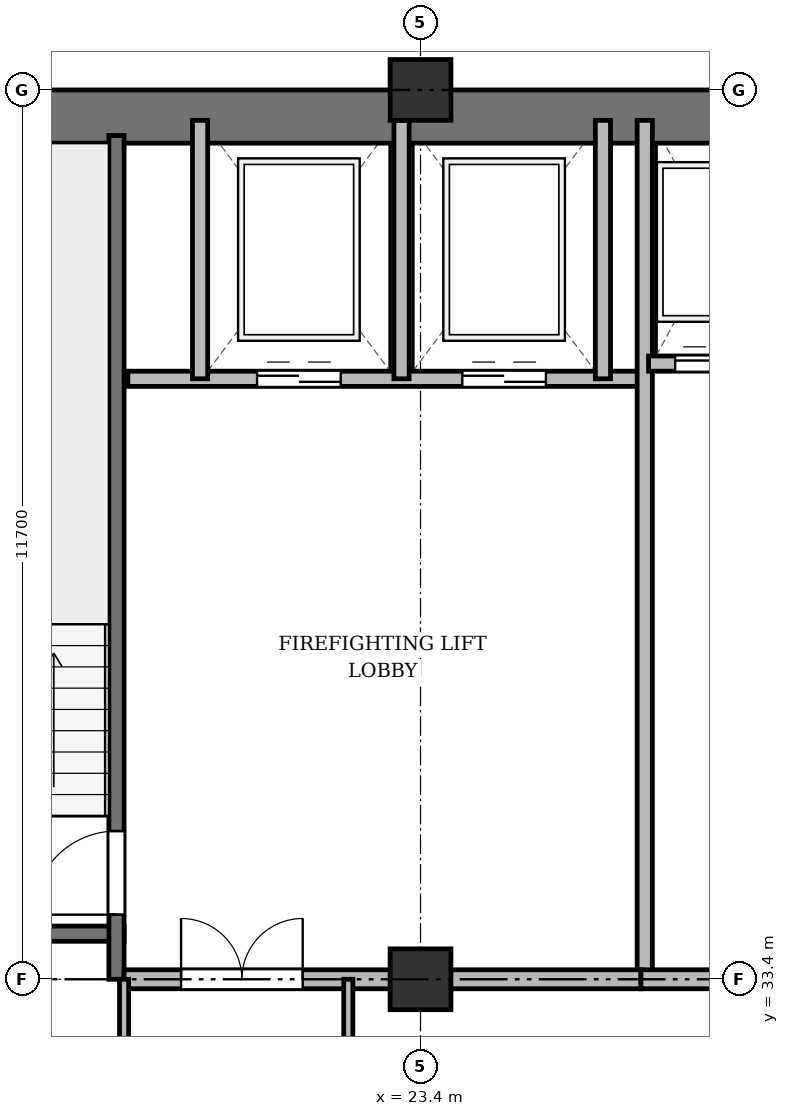
"""IFC4 building model, lengths in metres.
Left out: names, types, materials, properties, quantities, classifications, styles, units other than length and angle.
Written with IfcOpenShell. Run it as: python <this file> out.ifc"""

import sys

from ifc_helpers import new_model, si_unit, direction, frame, frame_2d, origin, origin_2d, place, context, subcontext, project, spatial, rectangle, extrude, source, transform, mapped, element, fill, save


model = new_model("IFC4")
c1 = context("Model", 3, precision=1e-05, world=origin(), true_north=direction((0.0, 1.0)))
c2 = subcontext(c1, "Body", "Model", "MODEL_VIEW")
j1 = project(units=[si_unit("LENGTHUNIT", "METRE"), si_unit("PLANEANGLEUNIT", "RADIAN")], contexts=[c1])
p1 = place(None, origin())
s1 = spatial("IfcSite", under=j1, at=p1, CompositionType="ELEMENT")
p2 = place(p1, origin())
s2 = spatial("IfcBuilding", under=s1, at=p2, CompositionType="ELEMENT")
p3 = place(p2, frame((0.0, 0.0, 85.3)))
s3 = spatial("IfcBuildingStorey", under=s2, at=p3, CompositionType="ELEMENT", Elevation=85.3)
m1 = source(origin(), c2, "Body", "SweptSolid", [
    extrude(rectangle(XDim=0.8, YDim=0.8, at=origin_2d()), origin(), (0.0, 0.0, 1.0), 3.6),
])
for number, where, z_axis, x_axis in (
    (1, (23.4, 33.4, 0.0), (0.0, 0.0, 1.0), (1.0, 0.0, 0.0)),
    (2, (23.4, 45.1, 0.0), (0.0, 0.0, 1.0), (1.0, 0.0, 0.0)),
):
    element("IfcColumn", number, at=place(p3, frame(where, z_axis=z_axis, x_axis=x_axis)), inside=s3, PredefinedType="COLUMN", context=c2, shape_type="MappedRepresentation", body=[
        mapped(m1, transform((0.0, 0.0, 0.0), x_axis=(1.0, 0.0, 0.0), y_axis=(0.0, 1.0, 0.0), z_axis=(0.0, 0.0, 1.0), scale=1.0)),
    ])
p4 = place(p3, frame((15.5, 44.75, 0.0), z_axis=(0.0, 0.0, 1.0), x_axis=(1.0, 0.0, 0.0)))
e3 = element("IfcWall", 3, at=p4, inside=s3, PredefinedType="SHEAR", context=c2, shape_type="SweptSolid", body=[
    extrude(rectangle(XDim=43.4, YDim=0.7, at=frame_2d((21.7, 0.0))), origin(), (0.0, 0.0, 1.0), 3.34),
])
p5 = place(p3, frame((16.1, 34.0, 0.0), z_axis=(0.0, 0.0, 1.0), x_axis=(1.0, 0.0, 0.0)))
e4 = element("IfcWall", 4, at=p5, inside=s3, PredefinedType="SHEAR", context=c2, shape_type="SweptSolid", body=[
    extrude(rectangle(XDim=3.4, YDim=0.2, at=frame_2d((1.7, 0.0))), origin(), (0.0, 0.0, 1.0), 3.34),
])
p6 = place(p3, frame((19.4, 33.4, 0.0), z_axis=(0.0, 0.0, 1.0), x_axis=(0.0, 1.0, 0.0)))
e5 = element("IfcWall", 5, at=p6, inside=s3, PredefinedType="SHEAR", context=c2, shape_type="SweptSolid", body=[
    extrude(rectangle(XDim=11.1, YDim=0.2, at=frame_2d((5.55, 0.0))), origin(), (0.0, 0.0, 1.0), 3.34),
])
p7 = place(p6, frame((0.85, 0.0, 0.0)))
e6 = element("IfcOpeningElement", 6, at=p7, cuts=e5, PredefinedType="OPENING", context=c2, shape_type="SweptSolid", body=[
    extrude(rectangle(XDim=1.1, YDim=2.15, at=frame_2d((0.55, 1.075))), frame((0.0, 0.11, 0.0), z_axis=(0.0, -1.0, 0.0), x_axis=(1.0, 0.0, 0.0)), (0.0, 0.0, 1.0), 0.22),
])
p8 = place(p3, frame((19.55, 41.3, 0.0), z_axis=(0.0, 0.0, 1.0), x_axis=(1.0, 0.0, 0.0)))
e7 = element("IfcWall", 7, at=p8, inside=s3, PredefinedType="SOLIDWALL", context=c2, shape_type="SweptSolid", body=[
    extrude(rectangle(XDim=6.75, YDim=0.2, at=frame_2d((3.375, 0.0))), origin(), (0.0, 0.0, 1.0), 3.34),
])
p9 = place(p8, frame((1.7, 0.0, 0.0)))
e8 = element("IfcOpeningElement", 8, at=p9, cuts=e7, PredefinedType="OPENING", context=c2, shape_type="SweptSolid", body=[
    extrude(rectangle(XDim=1.1, YDim=2.15, at=frame_2d((0.55, 1.075))), frame((0.0, 0.11, 0.0), z_axis=(0.0, -1.0, 0.0), x_axis=(1.0, 0.0, 0.0)), (0.0, 0.0, 1.0), 0.22),
])
p10 = place(p8, frame((4.4, 0.0, 0.0)))
e9 = element("IfcOpeningElement", 9, at=p10, cuts=e7, PredefinedType="OPENING", context=c2, shape_type="SweptSolid", body=[
    extrude(rectangle(XDim=1.1, YDim=2.15, at=frame_2d((0.55, 1.075))), frame((0.0, 0.11, 0.0), z_axis=(0.0, -1.0, 0.0), x_axis=(1.0, 0.0, 0.0)), (0.0, 0.0, 1.0), 0.22),
])
for number, where, z_axis, x_axis in (
    (10, (20.5, 41.3, 0.0), (0.0, 0.0, 1.0), (0.0, 1.0, 0.0)),
    (11, (23.15, 41.3, 0.0), (0.0, 0.0, 1.0), (0.0, 1.0, 0.0)),
    (12, (25.8, 41.3, 0.0), (0.0, 0.0, 1.0), (0.0, 1.0, 0.0)),
):
    element("IfcWall", number, at=place(p3, frame(where, z_axis=z_axis, x_axis=x_axis)), inside=s3, PredefinedType="SOLIDWALL", context=c2, shape_type="SweptSolid", body=[
        extrude(rectangle(XDim=3.4, YDim=0.2, at=frame_2d((1.7, 0.0))), origin(), (0.0, 0.0, 1.0), 3.34),
    ])
p11 = place(p3, frame((26.35, 33.4, 0.0), z_axis=(0.0, 0.0, 1.0), x_axis=(0.0, 1.0, 0.0)))
e13 = element("IfcWall", 13, at=p11, inside=s3, PredefinedType="SOLIDWALL", context=c2, shape_type="SweptSolid", body=[
    extrude(rectangle(XDim=11.3, YDim=0.2, at=frame_2d((5.65, 0.0))), origin(), (0.0, 0.0, 1.0), 2.752),
])
p12 = place(p3, frame((19.5, 33.4, 0.0), z_axis=(0.0, 0.0, 1.0), x_axis=(1.0, 0.0, 0.0)))
e14 = element("IfcWall", 14, at=p12, inside=s3, PredefinedType="PARTITIONING", context=c2, shape_type="SweptSolid", body=[
    extrude(rectangle(XDim=6.8, YDim=0.25, at=frame_2d((3.4, 0.0))), origin(), (0.0, 0.0, 1.0), 2.752),
])
p13 = place(p12, frame((0.75, 0.0, 0.0)))
e15 = element("IfcOpeningElement", 15, at=p13, cuts=e14, PredefinedType="OPENING", context=c2, shape_type="SweptSolid", body=[
    extrude(rectangle(XDim=1.6, YDim=2.2, at=frame_2d((0.8, 1.1))), frame((0.0, 0.135, 0.0), z_axis=(0.0, -1.0, 0.0), x_axis=(1.0, 0.0, 0.0)), (0.0, 0.0, 1.0), 0.27),
])
p14 = place(p3, frame((26.4, 41.5, 0.0), z_axis=(0.0, 0.0, 1.0), x_axis=(1.0, 0.0, 0.0)))
e16 = element("IfcWall", 16, at=p14, inside=s3, PredefinedType="SOLIDWALL", context=c2, shape_type="SweptSolid", body=[
    extrude(rectangle(XDim=6.95, YDim=0.2, at=frame_2d((3.475, 0.0))), origin(), (0.0, 0.0, 1.0), 3.34),
])
p15 = place(p14, frame((0.35, 0.0, 0.0)))
e17 = element("IfcOpeningElement", 17, at=p15, cuts=e16, PredefinedType="OPENING", context=c2, shape_type="SweptSolid", body=[
    extrude(rectangle(XDim=1.05, YDim=2.15, at=frame_2d((0.525, 1.075))), frame((0.0, 0.11, 0.0), z_axis=(0.0, -1.0, 0.0), x_axis=(1.0, 0.0, 0.0)), (0.0, 0.0, 1.0), 0.22),
])
p16 = place(p14, frame((2.05, 0.0, 0.0)))
e18 = element("IfcOpeningElement", 18, at=p16, cuts=e16, PredefinedType="OPENING", context=c2, shape_type="SweptSolid", body=[
    extrude(rectangle(XDim=1.05, YDim=2.15, at=frame_2d((0.525, 1.075))), frame((0.0, 0.11, 0.0), z_axis=(0.0, -1.0, 0.0), x_axis=(1.0, 0.0, 0.0)), (0.0, 0.0, 1.0), 0.22),
])
p17 = place(p14, frame((3.75, 0.0, 0.0)))
e19 = element("IfcOpeningElement", 19, at=p17, cuts=e16, PredefinedType="OPENING", context=c2, shape_type="SweptSolid", body=[
    extrude(rectangle(XDim=1.05, YDim=2.15, at=frame_2d((0.525, 1.075))), frame((0.0, 0.11, 0.0), z_axis=(0.0, -1.0, 0.0), x_axis=(1.0, 0.0, 0.0)), (0.0, 0.0, 1.0), 0.22),
])
p18 = place(p14, frame((5.45, 0.0, 0.0)))
e20 = element("IfcOpeningElement", 20, at=p18, cuts=e16, PredefinedType="OPENING", context=c2, shape_type="SweptSolid", body=[
    extrude(rectangle(XDim=1.05, YDim=2.15, at=frame_2d((0.525, 1.075))), frame((0.0, 0.11, 0.0), z_axis=(0.0, -1.0, 0.0), x_axis=(1.0, 0.0, 0.0)), (0.0, 0.0, 1.0), 0.22),
])
p19 = place(p3, frame((26.3, 33.4, 0.0), z_axis=(0.0, 0.0, 1.0), x_axis=(1.0, 0.0, 0.0)))
e21 = element("IfcWall", 21, at=p19, inside=s3, PredefinedType="PARTITIONING", context=c2, shape_type="SweptSolid", body=[
    extrude(rectangle(XDim=20.85, YDim=0.25, at=frame_2d((10.425, 0.0))), origin(), (0.0, 0.0, 1.0), 2.752),
])
p20 = place(p19, frame((9.2, 0.0, 0.0)))
e22 = element("IfcOpeningElement", 22, at=p20, cuts=e21, PredefinedType="OPENING", context=c2, shape_type="SweptSolid", body=[
    extrude(rectangle(XDim=1.6, YDim=2.2, at=frame_2d((0.8, 1.1))), frame((0.0, 0.135, 0.0), z_axis=(0.0, -1.0, 0.0), x_axis=(1.0, 0.0, 0.0)), (0.0, 0.0, 1.0), 0.27),
])
for number, where, z_axis, x_axis in (
    (23, (19.5, 29.8, 0.0), (0.0, 0.0, 1.0), (0.0, 1.0, 0.0)),
    (24, (22.45, 29.8, 0.0), (0.0, 0.0, 1.0), (0.0, 1.0, 0.0)),
):
    element("IfcWall", number, at=place(p3, frame(where, z_axis=z_axis, x_axis=x_axis)), inside=s3, PredefinedType="PARTITIONING", context=c2, shape_type="SweptSolid", body=[
        extrude(rectangle(XDim=3.6, YDim=0.12, at=frame_2d((1.8, 0.0))), origin(), (0.0, 0.0, 1.0), 2.752),
    ])
m2 = source(origin(), c2, "Body", "SweptSolid", [
    extrude(rectangle(XDim=1.1, YDim=2.15, at=frame_2d((0.55, 1.075))), frame((0.0, 0.025, 0.0), z_axis=(0.0, -1.0, 0.0), x_axis=(1.0, 0.0, 0.0)), (0.0, 0.0, 1.0), 0.05),
])
p21 = place(p7, origin())
e25 = element("IfcDoor", 25, at=p21, inside=s3, OperationType="SINGLE_SWING_LEFT", PredefinedType="DOOR", context=c2, shape_type="MappedRepresentation", body=[
    mapped(m2, transform((0.0, 0.0, 0.0), x_axis=(1.0, 0.0, 0.0), y_axis=(0.0, 1.0, 0.0), z_axis=(0.0, 0.0, 1.0), scale=1.0)),
])
fill(e6, e25)
p22 = place(p9, origin())
e26 = element("IfcDoor", 26, at=p22, inside=s3, OperationType="DOUBLE_DOOR_SLIDING", PredefinedType="DOOR", context=c2, shape_type="MappedRepresentation", body=[
    mapped(m2, transform((0.0, 0.0, 0.0), x_axis=(1.0, 0.0, 0.0), y_axis=(0.0, 1.0, 0.0), z_axis=(0.0, 0.0, 1.0), scale=1.0)),
])
fill(e8, e26)
p23 = place(p10, origin())
e27 = element("IfcDoor", 27, at=p23, inside=s3, OperationType="DOUBLE_DOOR_SLIDING", PredefinedType="DOOR", context=c2, shape_type="MappedRepresentation", body=[
    mapped(m2, transform((0.0, 0.0, 0.0), x_axis=(1.0, 0.0, 0.0), y_axis=(0.0, 1.0, 0.0), z_axis=(0.0, 0.0, 1.0), scale=1.0)),
])
fill(e9, e27)
m3 = source(origin(), c2, "Body", "SweptSolid", [
    extrude(rectangle(XDim=1.6, YDim=2.2, at=frame_2d((0.8, 1.1))), frame((0.0, 0.025, 0.0), z_axis=(0.0, -1.0, 0.0), x_axis=(1.0, 0.0, 0.0)), (0.0, 0.0, 1.0), 0.05),
])
p24 = place(p13, origin())
e28 = element("IfcDoor", 28, at=p24, inside=s3, OperationType="DOUBLE_DOOR_SINGLE_SWING", PredefinedType="DOOR", context=c2, shape_type="MappedRepresentation", body=[
    mapped(m3, transform((0.0, 0.0, 0.0), x_axis=(1.0, 0.0, 0.0), y_axis=(0.0, 1.0, 0.0), z_axis=(0.0, 0.0, 1.0), scale=1.0)),
])
fill(e15, e28)
m4 = source(origin(), c2, "Body", "SweptSolid", [
    extrude(rectangle(XDim=1.05, YDim=2.15, at=frame_2d((0.525, 1.075))), frame((0.0, 0.025, 0.0), z_axis=(0.0, -1.0, 0.0), x_axis=(1.0, 0.0, 0.0)), (0.0, 0.0, 1.0), 0.05),
])
p25 = place(p15, origin())
e29 = element("IfcDoor", 29, at=p25, inside=s3, OperationType="DOUBLE_DOOR_SLIDING", PredefinedType="DOOR", context=c2, shape_type="MappedRepresentation", body=[
    mapped(m4, transform((0.0, 0.0, 0.0), x_axis=(1.0, 0.0, 0.0), y_axis=(0.0, 1.0, 0.0), z_axis=(0.0, 0.0, 1.0), scale=1.0)),
])
fill(e17, e29)
save(model, sys.argv[1])
